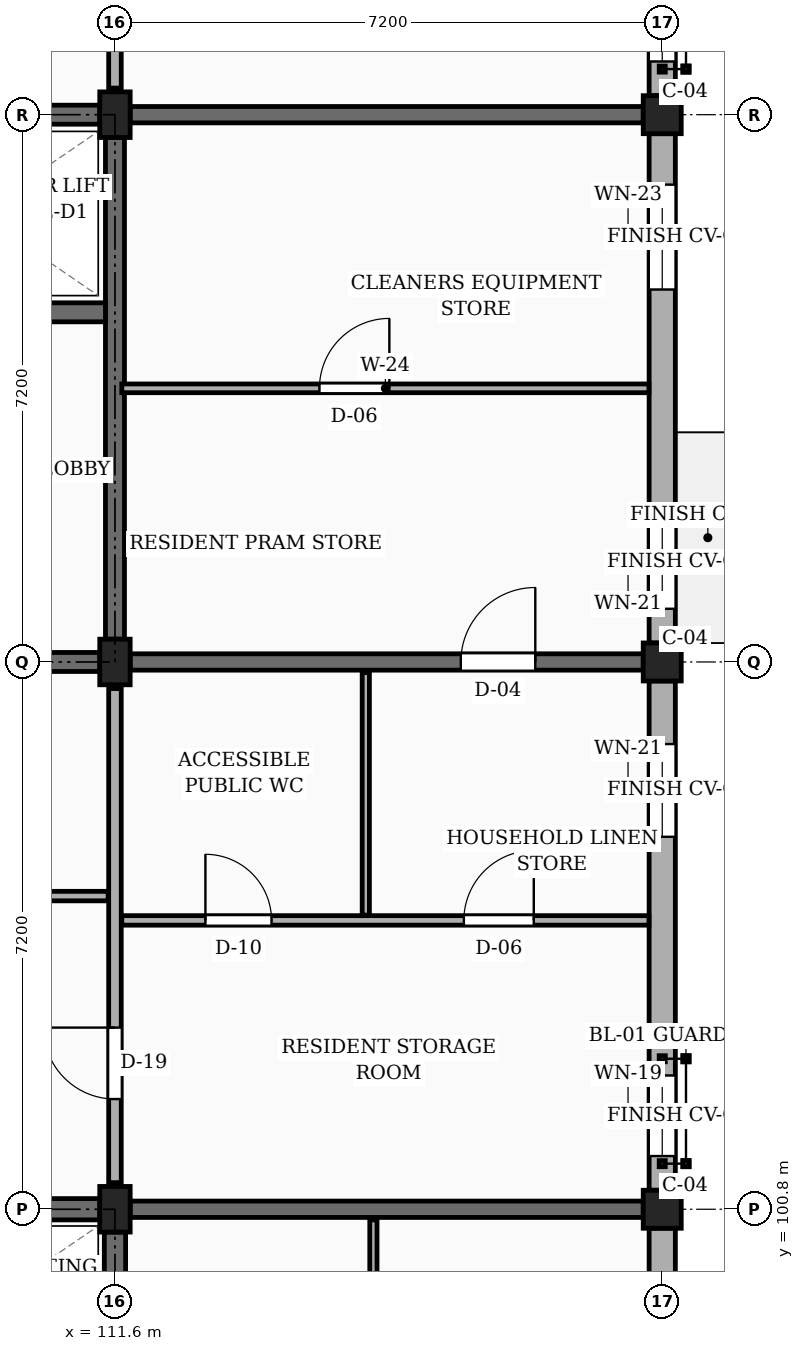
"""IFC4 building model, lengths in metres.
Left out: names, types, materials, properties, quantities, classifications, styles, units other than length and angle.
Written with IfcOpenShell. Run it as: python <this file> out.ifc"""

import sys

from ifc_helpers import new_model, si_unit, direction, frame, frame_2d, origin, origin_2d, place, context, subcontext, project, spatial, rectangle, extrude, element, fill, save


model = new_model("IFC4")
c1 = context("Model", 3, precision=1e-05, world=origin(), true_north=direction((0.0, 1.0)))
c2 = subcontext(c1, "Body", "Model", "MODEL_VIEW")
j1 = project(units=[si_unit("LENGTHUNIT", "METRE"), si_unit("PLANEANGLEUNIT", "RADIAN")], contexts=[c1])
p1 = place(None, origin())
s1 = spatial("IfcSite", under=j1, at=p1, CompositionType="ELEMENT")
p2 = place(p1, origin())
s2 = spatial("IfcBuilding", under=s1, at=p2, CompositionType="ELEMENT")
p3 = place(p2, frame((0.0, 0.0, 32.85)))
s3 = spatial("IfcBuildingStorey", under=s2, at=p3, CompositionType="ELEMENT", Elevation=32.85)
for number, where, z_axis, x_axis in (
    (1, (111.6, 100.8, 0.0), (0.0, 0.0, 1.0), (1.0, 0.0, 0.0)),
    (2, (111.6, 108.0, 0.0), (0.0, 0.0, 1.0), (1.0, 0.0, 0.0)),
    (3, (111.6, 115.2, 0.0), (0.0, 0.0, 1.0), (1.0, 0.0, 0.0)),
):
    element("IfcColumn", number, at=place(p3, frame(where, z_axis=z_axis, x_axis=x_axis)), inside=s3, PredefinedType="COLUMN", context=c2, shape_type="SweptSolid", body=[
        extrude(rectangle(XDim=0.4, YDim=0.6, at=origin_2d()), origin(), (0.0, 0.0, 1.0), 3.15),
    ])
for number, where, z_axis, x_axis in (
    (4, (118.8, 100.8, 0.0), (0.0, 0.0, 1.0), (1.0, 0.0, 0.0)),
    (5, (118.8, 108.0, 0.0), (0.0, 0.0, 1.0), (1.0, 0.0, 0.0)),
    (6, (118.8, 115.2, 0.0), (0.0, 0.0, 1.0), (1.0, 0.0, 0.0)),
):
    element("IfcColumn", number, at=place(p3, frame(where, z_axis=z_axis, x_axis=x_axis)), inside=s3, PredefinedType="COLUMN", context=c2, shape_type="SweptSolid", body=[
        extrude(rectangle(XDim=0.5, YDim=0.5, at=origin_2d()), origin(), (0.0, 0.0, 1.0), 3.15),
    ])
p4 = place(p3, frame((111.8, 100.8, 0.0), z_axis=(0.0, 0.0, 1.0), x_axis=(1.0, 0.0, 0.0)))
e7 = element("IfcWall", 7, at=p4, inside=s3, PredefinedType="SOLIDWALL", context=c2, shape_type="SweptSolid", body=[
    extrude(rectangle(XDim=6.75, YDim=0.215, at=frame_2d((3.375, 0.0))), origin(), (0.0, 0.0, 1.0), 2.22),
])
p5 = place(p3, frame((111.8, 108.0, 0.0), z_axis=(0.0, 0.0, 1.0), x_axis=(1.0, 0.0, 0.0)))
e8 = element("IfcWall", 8, at=p5, inside=s3, PredefinedType="SOLIDWALL", context=c2, shape_type="SweptSolid", body=[
    extrude(rectangle(XDim=6.75, YDim=0.215, at=frame_2d((3.375, 0.0))), origin(), (0.0, 0.0, 1.0), 2.22),
])
p6 = place(p5, frame((4.35, 0.0, 0.0)))
e9 = element("IfcOpeningElement", 9, at=p6, cuts=e8, PredefinedType="OPENING", context=c2, shape_type="SweptSolid", body=[
    extrude(rectangle(XDim=0.98, YDim=2.12, at=frame_2d((0.49, 1.06))), frame((0.0, 0.118, 0.0), z_axis=(0.0, -1.0, 0.0), x_axis=(1.0, 0.0, 0.0)), (0.0, 0.0, 1.0), 0.235),
])
p7 = place(p3, frame((111.8, 115.2, 0.0), z_axis=(0.0, 0.0, 1.0), x_axis=(1.0, 0.0, 0.0)))
e10 = element("IfcWall", 10, at=p7, inside=s3, PredefinedType="SOLIDWALL", context=c2, shape_type="SweptSolid", body=[
    extrude(rectangle(XDim=6.75, YDim=0.215, at=frame_2d((3.375, 0.0))), origin(), (0.0, 0.0, 1.0), 2.22),
])
p8 = place(p3, frame((118.8, 93.85, 0.0), z_axis=(0.0, 0.0, 1.0), x_axis=(0.0, 1.0, 0.0)))
e11 = element("IfcWall", 11, at=p8, inside=s3, PredefinedType="SOLIDWALL", context=c2, shape_type="SweptSolid", body=[
    extrude(rectangle(XDim=6.7, YDim=0.345, at=frame_2d((3.35, 0.0))), origin(), (0.0, 0.0, 1.0), 2.46),
])
p9 = place(p8, frame((0.45, 0.0, 0.78)))
e12 = element("IfcOpeningElement", 12, at=p9, cuts=e11, PredefinedType="OPENING", context=c2, shape_type="SweptSolid", body=[
    extrude(rectangle(XDim=0.9, YDim=1.36, at=frame_2d((0.45, 0.68))), frame((0.0, 0.183, 0.0), z_axis=(0.0, -1.0, 0.0), x_axis=(1.0, 0.0, 0.0)), (0.0, 0.0, 1.0), 0.365),
])
p10 = place(p8, frame((4.65, 0.0, 0.78)))
e13 = element("IfcOpeningElement", 13, at=p10, cuts=e11, PredefinedType="OPENING", context=c2, shape_type="SweptSolid", body=[
    extrude(rectangle(XDim=1.06, YDim=1.36, at=frame_2d((0.53, 0.68))), frame((0.0, 0.183, 0.0), z_axis=(0.0, -1.0, 0.0), x_axis=(1.0, 0.0, 0.0)), (0.0, 0.0, 1.0), 0.365),
])
p11 = place(p3, frame((118.8, 101.05, 0.0), z_axis=(0.0, 0.0, 1.0), x_axis=(0.0, 1.0, 0.0)))
e14 = element("IfcWall", 14, at=p11, inside=s3, PredefinedType="SOLIDWALL", context=c2, shape_type="SweptSolid", body=[
    extrude(rectangle(XDim=6.7, YDim=0.345, at=frame_2d((3.35, 0.0))), origin(), (0.0, 0.0, 1.0), 2.46),
])
p12 = place(p11, frame((0.45, 0.0, 0.78)))
e15 = element("IfcOpeningElement", 15, at=p12, cuts=e14, PredefinedType="OPENING", context=c2, shape_type="SweptSolid", body=[
    extrude(rectangle(XDim=1.06, YDim=1.36, at=frame_2d((0.53, 0.68))), frame((0.0, 0.183, 0.0), z_axis=(0.0, -1.0, 0.0), x_axis=(1.0, 0.0, 0.0)), (0.0, 0.0, 1.0), 0.365),
])
p13 = place(p11, frame((4.65, 0.0, 0.78)))
e16 = element("IfcOpeningElement", 16, at=p13, cuts=e14, PredefinedType="OPENING", context=c2, shape_type="SweptSolid", body=[
    extrude(rectangle(XDim=1.22, YDim=1.36, at=frame_2d((0.61, 0.68))), frame((0.0, 0.183, 0.0), z_axis=(0.0, -1.0, 0.0), x_axis=(1.0, 0.0, 0.0)), (0.0, 0.0, 1.0), 0.365),
])
p14 = place(p3, frame((118.8, 108.25, 0.0), z_axis=(0.0, 0.0, 1.0), x_axis=(0.0, 1.0, 0.0)))
e17 = element("IfcWall", 17, at=p14, inside=s3, PredefinedType="SOLIDWALL", context=c2, shape_type="SweptSolid", body=[
    extrude(rectangle(XDim=6.7, YDim=0.345, at=frame_2d((3.35, 0.0))), origin(), (0.0, 0.0, 1.0), 2.46),
])
p15 = place(p14, frame((0.45, 0.0, 0.78)))
e18 = element("IfcOpeningElement", 18, at=p15, cuts=e17, PredefinedType="OPENING", context=c2, shape_type="SweptSolid", body=[
    extrude(rectangle(XDim=1.22, YDim=1.36, at=frame_2d((0.61, 0.68))), frame((0.0, 0.183, 0.0), z_axis=(0.0, -1.0, 0.0), x_axis=(1.0, 0.0, 0.0)), (0.0, 0.0, 1.0), 0.365),
])
p16 = place(p14, frame((4.65, 0.0, 0.78)))
e19 = element("IfcOpeningElement", 19, at=p16, cuts=e17, PredefinedType="OPENING", context=c2, shape_type="SweptSolid", body=[
    extrude(rectangle(XDim=1.38, YDim=1.36, at=frame_2d((0.69, 0.68))), frame((0.0, 0.183, 0.0), z_axis=(0.0, -1.0, 0.0), x_axis=(1.0, 0.0, 0.0)), (0.0, 0.0, 1.0), 0.365),
])
p17 = place(p3, frame((118.8, 115.45, 0.0), z_axis=(0.0, 0.0, 1.0), x_axis=(0.0, 1.0, 0.0)))
e20 = element("IfcWall", 20, at=p17, inside=s3, PredefinedType="SOLIDWALL", context=c2, shape_type="SweptSolid", body=[
    extrude(rectangle(XDim=6.7, YDim=0.345, at=frame_2d((3.35, 0.0))), origin(), (0.0, 0.0, 1.0), 2.46),
])
p18 = place(p17, frame((0.45, 0.0, 0.78)))
e21 = element("IfcOpeningElement", 21, at=p18, cuts=e20, PredefinedType="OPENING", context=c2, shape_type="SweptSolid", body=[
    extrude(rectangle(XDim=1.38, YDim=1.36, at=frame_2d((0.69, 0.68))), frame((0.0, 0.183, 0.0), z_axis=(0.0, -1.0, 0.0), x_axis=(1.0, 0.0, 0.0)), (0.0, 0.0, 1.0), 0.365),
])
p19 = place(p17, frame((4.65, 0.0, 0.78)))
e22 = element("IfcOpeningElement", 22, at=p19, cuts=e20, PredefinedType="OPENING", context=c2, shape_type="SweptSolid", body=[
    extrude(rectangle(XDim=0.94, YDim=1.44, at=frame_2d((0.47, 0.72))), frame((0.0, 0.183, 0.0), z_axis=(0.0, -1.0, 0.0), x_axis=(1.0, 0.0, 0.0)), (0.0, 0.0, 1.0), 0.365),
])
p20 = place(p3, frame((104.6, 100.8, 0.0), z_axis=(0.0, 0.0, 1.0), x_axis=(1.0, 0.0, 0.0)))
e23 = element("IfcWall", 23, at=p20, inside=s3, PredefinedType="SHEAR", context=c2, shape_type="SweptSolid", body=[
    extrude(rectangle(XDim=6.8, YDim=0.28, at=frame_2d((3.4, 0.0))), origin(), (0.0, 0.0, 1.0), 2.89),
])
p21 = place(p3, frame((111.6, 93.9, 0.0), z_axis=(0.0, 0.0, 1.0), x_axis=(0.0, 1.0, 0.0)))
e24 = element("IfcWall", 24, at=p21, inside=s3, PredefinedType="SHEAR", context=c2, shape_type="SweptSolid", body=[
    extrude(rectangle(XDim=6.6, YDim=0.28, at=frame_2d((3.3, 0.0))), origin(), (0.0, 0.0, 1.0), 2.89),
])
p22 = place(p3, frame((104.6, 115.2, 0.0), z_axis=(0.0, 0.0, 1.0), x_axis=(1.0, 0.0, 0.0)))
e25 = element("IfcWall", 25, at=p22, inside=s3, PredefinedType="SHEAR", context=c2, shape_type="SweptSolid", body=[
    extrude(rectangle(XDim=6.8, YDim=0.25, at=frame_2d((3.4, 0.0))), origin(), (0.0, 0.0, 1.0), 2.89),
])
p23 = place(p3, frame((111.6, 108.3, 0.0), z_axis=(0.0, 0.0, 1.0), x_axis=(0.0, 1.0, 0.0)))
e26 = element("IfcWall", 26, at=p23, inside=s3, PredefinedType="SHEAR", context=c2, shape_type="SweptSolid", body=[
    extrude(rectangle(XDim=6.6, YDim=0.25, at=frame_2d((3.3, 0.0))), origin(), (0.0, 0.0, 1.0), 2.89),
])
p24 = place(p3, frame((104.6, 108.0, 0.0), z_axis=(0.0, 0.0, 1.0), x_axis=(1.0, 0.0, 0.0)))
e27 = element("IfcWall", 27, at=p24, inside=s3, PredefinedType="SHEAR", context=c2, shape_type="SweptSolid", body=[
    extrude(rectangle(XDim=6.8, YDim=0.25, at=frame_2d((3.4, 0.0))), origin(), (0.0, 0.0, 1.0), 2.89),
])
p25 = place(p24, frame((4.55, 0.0, 0.0)))
e28 = element("IfcOpeningElement", 28, at=p25, cuts=e27, PredefinedType="OPENING", context=c2, shape_type="SweptSolid", body=[
    extrude(rectangle(XDim=1.1, YDim=2.15, at=frame_2d((0.55, 1.075))), frame((0.0, 0.135, 0.0), z_axis=(0.0, -1.0, 0.0), x_axis=(1.0, 0.0, 0.0)), (0.0, 0.0, 1.0), 0.27),
])
p26 = place(p3, frame((108.125, 112.6, 0.0), z_axis=(0.0, 0.0, 1.0), x_axis=(1.0, 0.0, 0.0)))
e29 = element("IfcWall", 29, at=p26, inside=s3, PredefinedType="SHEAR", context=c2, shape_type="SweptSolid", body=[
    extrude(rectangle(XDim=3.35, YDim=0.25, at=frame_2d((1.675, 0.0))), origin(), (0.0, 0.0, 1.0), 2.89),
])
p27 = place(p26, frame((1.1, 0.0, 0.0)))
e30 = element("IfcOpeningElement", 30, at=p27, cuts=e29, PredefinedType="OPENING", context=c2, shape_type="SweptSolid", body=[
    extrude(rectangle(XDim=1.0, YDim=2.2, at=frame_2d((0.5, 1.1))), frame((0.0, 0.135, 0.0), z_axis=(0.0, -1.0, 0.0), x_axis=(1.0, 0.0, 0.0)), (0.0, 0.0, 1.0), 0.27),
])
p28 = place(p3, frame((111.6, 101.15, 0.0), z_axis=(0.0, 0.0, 1.0), x_axis=(0.0, 1.0, 0.0)))
e31 = element("IfcWall", 31, at=p28, inside=s3, PredefinedType="PARTITIONING", context=c2, shape_type="SweptSolid", body=[
    extrude(rectangle(XDim=6.5, YDim=0.165, at=frame_2d((3.25, 0.0))), origin(), (0.0, 0.0, 1.0), 2.325),
])
p29 = place(p28, frame((1.1, 0.0, 0.0)))
e32 = element("IfcOpeningElement", 32, at=p29, cuts=e31, PredefinedType="OPENING", context=c2, shape_type="SweptSolid", body=[
    extrude(rectangle(XDim=0.94, YDim=2.12, at=frame_2d((0.47, 1.06))), frame((0.0, 0.093, 0.0), z_axis=(0.0, -1.0, 0.0), x_axis=(1.0, 0.0, 0.0)), (0.0, 0.0, 1.0), 0.185),
])
p30 = place(p3, frame((111.6, 115.55, 0.0), z_axis=(0.0, 0.0, 1.0), x_axis=(0.0, 1.0, 0.0)))
e33 = element("IfcWall", 33, at=p30, inside=s3, PredefinedType="PARTITIONING", context=c2, shape_type="SweptSolid", body=[
    extrude(rectangle(XDim=6.5, YDim=0.165, at=frame_2d((3.25, 0.0))), origin(), (0.0, 0.0, 1.0), 2.325),
])
p31 = place(p30, frame((1.1, 0.0, 0.0)))
e34 = element("IfcOpeningElement", 34, at=p31, cuts=e33, PredefinedType="OPENING", context=c2, shape_type="SweptSolid", body=[
    extrude(rectangle(XDim=1.14, YDim=2.18, at=frame_2d((0.57, 1.09))), frame((0.0, 0.093, 0.0), z_axis=(0.0, -1.0, 0.0), x_axis=(1.0, 0.0, 0.0)), (0.0, 0.0, 1.0), 0.185),
])
p32 = place(p3, frame((115.0, 96.97, 0.0), z_axis=(0.0, 0.0, 1.0), x_axis=(0.0, 1.0, 0.0)))
e35 = element("IfcWall", 35, at=p32, inside=s3, PredefinedType="PARTITIONING", context=c2, shape_type="SweptSolid", body=[
    extrude(rectangle(XDim=3.69, YDim=0.095, at=frame_2d((1.845, 0.0))), origin(), (0.0, 0.0, 1.0), 2.325),
])
p33 = place(p3, frame((104.49, 104.92, 0.0), z_axis=(0.0, 0.0, 1.0), x_axis=(1.0, 0.0, 0.0)))
e36 = element("IfcWall", 36, at=p33, inside=s3, PredefinedType="PARTITIONING", context=c2, shape_type="SweptSolid", body=[
    extrude(rectangle(XDim=7.02, YDim=0.125, at=frame_2d((3.51, 0.0))), origin(), (0.0, 0.0, 1.0), 2.325),
])
p34 = place(p33, frame((2.85, 0.0, 0.0)))
e37 = element("IfcOpeningElement", 37, at=p34, cuts=e36, PredefinedType="OPENING", context=c2, shape_type="SweptSolid", body=[
    extrude(rectangle(XDim=1.02, YDim=2.15, at=frame_2d((0.51, 1.075))), frame((0.0, 0.073, 0.0), z_axis=(0.0, -1.0, 0.0), x_axis=(1.0, 0.0, 0.0)), (0.0, 0.0, 1.0), 0.145),
])
p35 = place(p3, frame((111.69, 104.6, 0.0), z_axis=(0.0, 0.0, 1.0), x_axis=(1.0, 0.0, 0.0)))
e38 = element("IfcWall", 38, at=p35, inside=s3, PredefinedType="PARTITIONING", context=c2, shape_type="SweptSolid", body=[
    extrude(rectangle(XDim=6.935, YDim=0.125, at=frame_2d((3.468, 0.0))), origin(), (0.0, 0.0, 1.0), 2.325),
])
p36 = place(p35, frame((1.1, 0.0, 0.0)))
e39 = element("IfcOpeningElement", 39, at=p36, cuts=e38, PredefinedType="OPENING", context=c2, shape_type="SweptSolid", body=[
    extrude(rectangle(XDim=0.87, YDim=2.05, at=frame_2d((0.435, 1.025))), frame((0.0, 0.073, 0.0), z_axis=(0.0, -1.0, 0.0), x_axis=(1.0, 0.0, 0.0)), (0.0, 0.0, 1.0), 0.145),
])
p37 = place(p35, frame((4.5, 0.0, 0.0)))
e40 = element("IfcOpeningElement", 40, at=p37, cuts=e38, PredefinedType="OPENING", context=c2, shape_type="SweptSolid", body=[
    extrude(rectangle(XDim=0.92, YDim=2.1, at=frame_2d((0.46, 1.05))), frame((0.0, 0.073, 0.0), z_axis=(0.0, -1.0, 0.0), x_axis=(1.0, 0.0, 0.0)), (0.0, 0.0, 1.0), 0.145),
])
p38 = place(p3, frame((114.9, 104.67, 0.0), z_axis=(0.0, 0.0, 1.0), x_axis=(0.0, 1.0, 0.0)))
e41 = element("IfcWall", 41, at=p38, inside=s3, PredefinedType="PARTITIONING", context=c2, shape_type="SweptSolid", body=[
    extrude(rectangle(XDim=3.19, YDim=0.095, at=frame_2d((1.595, 0.0))), origin(), (0.0, 0.0, 1.0), 2.325),
])
p39 = place(p3, frame((111.69, 111.6, 0.0), z_axis=(0.0, 0.0, 1.0), x_axis=(1.0, 0.0, 0.0)))
e42 = element("IfcWall", 42, at=p39, inside=s3, PredefinedType="PARTITIONING", context=c2, shape_type="SweptSolid", body=[
    extrude(rectangle(XDim=6.935, YDim=0.115, at=frame_2d((3.468, 0.0))), origin(), (0.0, 0.0, 1.0), 2.325),
])
p40 = place(p39, frame((2.6, 0.0, 0.0)))
e43 = element("IfcOpeningElement", 43, at=p40, cuts=e42, PredefinedType="OPENING", context=c2, shape_type="SweptSolid", body=[
    extrude(rectangle(XDim=0.92, YDim=2.1, at=frame_2d((0.46, 1.05))), frame((0.0, 0.067, 0.0), z_axis=(0.0, -1.0, 0.0), x_axis=(1.0, 0.0, 0.0)), (0.0, 0.0, 1.0), 0.135),
])
p41 = place(p12, origin())
e44 = element("IfcWindow", 44, at=p41, inside=s3, PartitioningType="SINGLE_PANEL", PredefinedType="WINDOW", context=c2, shape_type="SweptSolid", body=[
    extrude(rectangle(XDim=1.06, YDim=1.36, at=frame_2d((0.53, 0.68))), frame((0.0, 0.03, 0.0), z_axis=(0.0, -1.0, 0.0), x_axis=(1.0, 0.0, 0.0)), (0.0, 0.0, 1.0), 0.06),
])
fill(e15, e44)
p42 = place(p13, origin())
e45 = element("IfcWindow", 45, at=p42, inside=s3, PartitioningType="SINGLE_PANEL", PredefinedType="WINDOW", context=c2, shape_type="SweptSolid", body=[
    extrude(rectangle(XDim=1.22, YDim=1.36, at=frame_2d((0.61, 0.68))), frame((0.0, 0.03, 0.0), z_axis=(0.0, -1.0, 0.0), x_axis=(1.0, 0.0, 0.0)), (0.0, 0.0, 1.0), 0.06),
])
fill(e16, e45)
p43 = place(p15, origin())
e46 = element("IfcWindow", 46, at=p43, inside=s3, PartitioningType="SINGLE_PANEL", PredefinedType="WINDOW", context=c2, shape_type="SweptSolid", body=[
    extrude(rectangle(XDim=1.22, YDim=1.36, at=frame_2d((0.61, 0.68))), frame((0.0, 0.03, 0.0), z_axis=(0.0, -1.0, 0.0), x_axis=(1.0, 0.0, 0.0)), (0.0, 0.0, 1.0), 0.06),
])
fill(e18, e46)
p44 = place(p16, origin())
e47 = element("IfcWindow", 47, at=p44, inside=s3, PartitioningType="SINGLE_PANEL", PredefinedType="WINDOW", context=c2, shape_type="SweptSolid", body=[
    extrude(rectangle(XDim=1.38, YDim=1.36, at=frame_2d((0.69, 0.68))), frame((0.0, 0.03, 0.0), z_axis=(0.0, -1.0, 0.0), x_axis=(1.0, 0.0, 0.0)), (0.0, 0.0, 1.0), 0.06),
])
fill(e19, e47)
p45 = place(p18, origin())
e48 = element("IfcWindow", 48, at=p45, inside=s3, PartitioningType="SINGLE_PANEL", PredefinedType="WINDOW", context=c2, shape_type="SweptSolid", body=[
    extrude(rectangle(XDim=1.38, YDim=1.36, at=frame_2d((0.69, 0.68))), frame((0.0, 0.03, 0.0), z_axis=(0.0, -1.0, 0.0), x_axis=(1.0, 0.0, 0.0)), (0.0, 0.0, 1.0), 0.06),
])
fill(e21, e48)
p46 = place(p29, origin())
e49 = element("IfcDoor", 49, at=p46, inside=s3, OperationType="SINGLE_SWING_RIGHT", PredefinedType="DOOR", context=c2, shape_type="SweptSolid", body=[
    extrude(rectangle(XDim=0.94, YDim=2.12, at=frame_2d((0.47, 1.06))), frame((0.0, 0.025, 0.0), z_axis=(0.0, -1.0, 0.0), x_axis=(1.0, 0.0, 0.0)), (0.0, 0.0, 1.0), 0.05),
])
fill(e32, e49)
p47 = place(p36, origin())
e50 = element("IfcDoor", 50, at=p47, inside=s3, OperationType="SINGLE_SWING_LEFT", PredefinedType="DOOR", context=c2, shape_type="SweptSolid", body=[
    extrude(rectangle(XDim=0.87, YDim=2.05, at=frame_2d((0.435, 1.025))), frame((0.0, 0.025, 0.0), z_axis=(0.0, -1.0, 0.0), x_axis=(1.0, 0.0, 0.0)), (0.0, 0.0, 1.0), 0.05),
])
fill(e39, e50)
p48 = place(p37, origin())
e51 = element("IfcDoor", 51, at=p48, inside=s3, OperationType="SINGLE_SWING_RIGHT", PredefinedType="DOOR", context=c2, shape_type="SweptSolid", body=[
    extrude(rectangle(XDim=0.92, YDim=2.1, at=frame_2d((0.46, 1.05))), frame((0.0, 0.025, 0.0), z_axis=(0.0, -1.0, 0.0), x_axis=(1.0, 0.0, 0.0)), (0.0, 0.0, 1.0), 0.05),
])
fill(e40, e51)
p49 = place(p40, origin())
e52 = element("IfcDoor", 52, at=p49, inside=s3, OperationType="SINGLE_SWING_RIGHT", PredefinedType="DOOR", context=c2, shape_type="SweptSolid", body=[
    extrude(rectangle(XDim=0.92, YDim=2.1, at=frame_2d((0.46, 1.05))), frame((0.0, 0.025, 0.0), z_axis=(0.0, -1.0, 0.0), x_axis=(1.0, 0.0, 0.0)), (0.0, 0.0, 1.0), 0.05),
])
fill(e43, e52)
p50 = place(p6, origin())
e53 = element("IfcDoor", 53, at=p50, inside=s3, OperationType="SINGLE_SWING_RIGHT", PredefinedType="DOOR", context=c2, shape_type="SweptSolid", body=[
    extrude(rectangle(XDim=0.98, YDim=2.12, at=frame_2d((0.49, 1.06))), frame((0.0, 0.025, 0.0), z_axis=(0.0, -1.0, 0.0), x_axis=(1.0, 0.0, 0.0)), (0.0, 0.0, 1.0), 0.05),
])
fill(e9, e53)
save(model, sys.argv[1])
